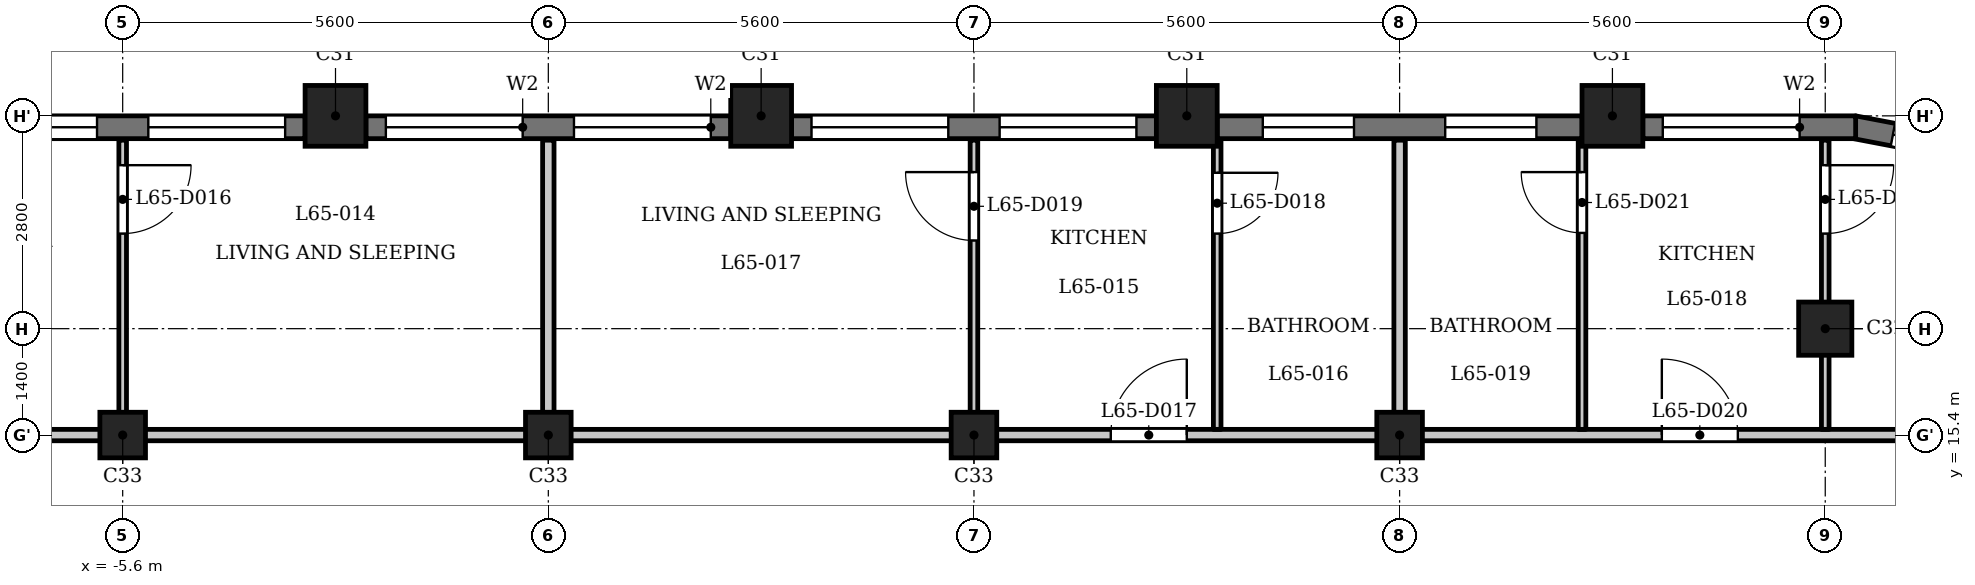
"""IFC4 building model, lengths in metres.
Left out: names, types, materials, properties, quantities, classifications, styles, units other than length and angle.
Written with IfcOpenShell. Run it as: python <this file> out.ifc"""

import sys

from ifc_helpers import new_model, si_unit, direction, frame, frame_2d, origin, origin_2d, place, context, subcontext, project, spatial, rectangle, extrude, element, fill, save


model = new_model("IFC4")
c1 = context("Model", 3, precision=1e-05, world=origin(), true_north=direction((0.0, 1.0)))
c2 = subcontext(c1, "Body", "Model", "MODEL_VIEW")
j1 = project(units=[si_unit("LENGTHUNIT", "METRE"), si_unit("PLANEANGLEUNIT", "RADIAN")], contexts=[c1])
p1 = place(None, origin())
s1 = spatial("IfcSite", under=j1, at=p1, CompositionType="ELEMENT")
p2 = place(p1, origin())
s2 = spatial("IfcBuilding", under=s1, at=p2, CompositionType="ELEMENT")
p3 = place(p2, frame((0.0, 0.0, 252.2)))
s3 = spatial("IfcBuildingStorey", under=s2, at=p3, CompositionType="ELEMENT", Elevation=252.2)
for number, where, z_axis, x_axis in (
    (1, (14.0, 19.6, 0.0), (0.0, 0.0, 1.0), (1.0, 0.0, 0.0)),
    (2, (8.4, 19.6, 0.0), (0.0, 0.0, 1.0), (1.0, 0.0, 0.0)),
    (3, (2.8, 19.6, 0.0), (0.0, 0.0, 1.0), (1.0, 0.0, 0.0)),
    (4, (-2.8, 19.6, 0.0), (0.0, 0.0, 1.0), (1.0, 0.0, 0.0)),
):
    element("IfcColumn", number, at=place(p3, frame(where, z_axis=z_axis, x_axis=x_axis)), inside=s3, PredefinedType="COLUMN", context=c2, shape_type="SweptSolid", body=[
        extrude(rectangle(XDim=0.8, YDim=0.8, at=origin_2d()), origin(), (0.0, 0.0, 1.0), 3.5),
    ])
p4 = place(p3, frame((16.8, 16.8, 0.0), z_axis=(0.0, 0.0, 1.0), x_axis=(1.0, 0.0, 0.0)))
e5 = element("IfcColumn", 5, at=p4, inside=s3, PredefinedType="COLUMN", context=c2, shape_type="SweptSolid", body=[
    extrude(rectangle(XDim=0.7, YDim=0.7, at=origin_2d()), origin(), (0.0, 0.0, 1.0), 3.5),
])
for number, where, z_axis, x_axis in (
    (6, (-5.6, 15.4, 0.0), (0.0, 0.0, 1.0), (1.0, 0.0, 0.0)),
    (7, (0.0, 15.4, 0.0), (0.0, 0.0, 1.0), (1.0, 0.0, 0.0)),
    (8, (5.6, 15.4, 0.0), (0.0, 0.0, 1.0), (1.0, 0.0, 0.0)),
    (9, (11.2, 15.4, 0.0), (0.0, 0.0, 1.0), (1.0, 0.0, 0.0)),
):
    element("IfcColumn", number, at=place(p3, frame(where, z_axis=z_axis, x_axis=x_axis)), inside=s3, PredefinedType="COLUMN", context=c2, shape_type="SweptSolid", body=[
        extrude(rectangle(XDim=0.6, YDim=0.6, at=origin_2d()), origin(), (0.0, 0.0, 1.0), 3.5),
    ])
p5 = place(p3, frame((18.995, 19.105, 0.0), z_axis=(0.0, 0.0, 1.0), x_axis=(-0.982301706131, 0.187305520826, 0.0)))
e10 = element("IfcWall", 10, at=p5, inside=s3, PredefinedType="SOLIDWALL", context=c2, shape_type="SweptSolid", body=[
    extrude(rectangle(XDim=1.856, YDim=0.3, at=frame_2d((0.928, 0.0))), origin(), (0.0, 0.0, 1.0), 2.55),
])
p6 = place(p5, frame((0.528, 0.0, 0.6)))
e11 = element("IfcOpeningElement", 11, at=p6, cuts=e10, PredefinedType="OPENING", context=c2, shape_type="SweptSolid", body=[
    extrude(rectangle(XDim=0.8, YDim=1.55, at=frame_2d((0.4, 0.775))), frame((0.0, 0.16, 0.0), z_axis=(0.0, -1.0, 0.0), x_axis=(1.0, 0.0, 0.0)), (0.0, 0.0, 1.0), 0.32),
])
p7 = place(p3, frame((17.2, 19.45, 0.0), z_axis=(0.0, 0.0, 1.0), x_axis=(-1.0, 0.0, 0.0)))
e12 = element("IfcWall", 12, at=p7, inside=s3, PredefinedType="SOLIDWALL", context=c2, shape_type="SweptSolid", body=[
    extrude(rectangle(XDim=2.8, YDim=0.3, at=frame_2d((1.4, 0.0))), origin(), (0.0, 0.0, 1.0), 2.55),
])
p8 = place(p7, frame((0.738, 0.0, 0.9)))
e13 = element("IfcOpeningElement", 13, at=p8, cuts=e12, PredefinedType="OPENING", context=c2, shape_type="SweptSolid", body=[
    extrude(rectangle(XDim=1.8, YDim=1.25, at=frame_2d((0.9, 0.625))), frame((0.0, 0.16, 0.0), z_axis=(0.0, -1.0, 0.0), x_axis=(1.0, 0.0, 0.0)), (0.0, 0.0, 1.0), 0.32),
])
p9 = place(p3, frame((13.6, 19.45, 0.0), z_axis=(0.0, 0.0, 1.0), x_axis=(-1.0, 0.0, 0.0)))
e14 = element("IfcWall", 14, at=p9, inside=s3, PredefinedType="SOLIDWALL", context=c2, shape_type="SweptSolid", body=[
    extrude(rectangle(XDim=4.8, YDim=0.3, at=frame_2d((2.4, 0.0))), origin(), (0.0, 0.0, 1.0), 2.55),
])
p10 = place(p9, frame((0.6, 0.0, 0.6)))
e15 = element("IfcOpeningElement", 15, at=p10, cuts=e14, PredefinedType="OPENING", context=c2, shape_type="SweptSolid", body=[
    extrude(rectangle(XDim=1.2, YDim=1.55, at=frame_2d((0.6, 0.775))), frame((0.0, 0.16, 0.0), z_axis=(0.0, -1.0, 0.0), x_axis=(1.0, 0.0, 0.0)), (0.0, 0.0, 1.0), 0.32),
])
p11 = place(p9, frame((3.0, 0.0, 0.6)))
e16 = element("IfcOpeningElement", 16, at=p11, cuts=e14, PredefinedType="OPENING", context=c2, shape_type="SweptSolid", body=[
    extrude(rectangle(XDim=1.2, YDim=1.55, at=frame_2d((0.6, 0.775))), frame((0.0, 0.16, 0.0), z_axis=(0.0, -1.0, 0.0), x_axis=(1.0, 0.0, 0.0)), (0.0, 0.0, 1.0), 0.32),
])
p12 = place(p3, frame((8.0, 19.45, 0.0), z_axis=(0.0, 0.0, 1.0), x_axis=(-1.0, 0.0, 0.0)))
e17 = element("IfcWall", 17, at=p12, inside=s3, PredefinedType="SOLIDWALL", context=c2, shape_type="SweptSolid", body=[
    extrude(rectangle(XDim=4.8, YDim=0.3, at=frame_2d((2.4, 0.0))), origin(), (0.0, 0.0, 1.0), 2.55),
])
p13 = place(p12, frame((0.262, 0.0, 0.9)))
e18 = element("IfcOpeningElement", 18, at=p13, cuts=e17, PredefinedType="OPENING", context=c2, shape_type="SweptSolid", body=[
    extrude(rectangle(XDim=1.8, YDim=1.25, at=frame_2d((0.9, 0.625))), frame((0.0, 0.16, 0.0), z_axis=(0.0, -1.0, 0.0), x_axis=(1.0, 0.0, 0.0)), (0.0, 0.0, 1.0), 0.32),
])
p14 = place(p12, frame((2.738, 0.0, 0.9)))
e19 = element("IfcOpeningElement", 19, at=p14, cuts=e17, PredefinedType="OPENING", context=c2, shape_type="SweptSolid", body=[
    extrude(rectangle(XDim=1.8, YDim=1.25, at=frame_2d((0.9, 0.625))), frame((0.0, 0.16, 0.0), z_axis=(0.0, -1.0, 0.0), x_axis=(1.0, 0.0, 0.0)), (0.0, 0.0, 1.0), 0.32),
])
p15 = place(p3, frame((2.4, 19.45, 0.0), z_axis=(0.0, 0.0, 1.0), x_axis=(-1.0, 0.0, 0.0)))
e20 = element("IfcWall", 20, at=p15, inside=s3, PredefinedType="SOLIDWALL", context=c2, shape_type="SweptSolid", body=[
    extrude(rectangle(XDim=4.8, YDim=0.3, at=frame_2d((2.4, 0.0))), origin(), (0.0, 0.0, 1.0), 2.55),
])
p16 = place(p15, frame((0.262, 0.0, 0.9)))
e21 = element("IfcOpeningElement", 21, at=p16, cuts=e20, PredefinedType="OPENING", context=c2, shape_type="SweptSolid", body=[
    extrude(rectangle(XDim=1.8, YDim=1.25, at=frame_2d((0.9, 0.625))), frame((0.0, 0.16, 0.0), z_axis=(0.0, -1.0, 0.0), x_axis=(1.0, 0.0, 0.0)), (0.0, 0.0, 1.0), 0.32),
])
p17 = place(p15, frame((2.738, 0.0, 0.9)))
e22 = element("IfcOpeningElement", 22, at=p17, cuts=e20, PredefinedType="OPENING", context=c2, shape_type="SweptSolid", body=[
    extrude(rectangle(XDim=1.8, YDim=1.25, at=frame_2d((0.9, 0.625))), frame((0.0, 0.16, 0.0), z_axis=(0.0, -1.0, 0.0), x_axis=(1.0, 0.0, 0.0)), (0.0, 0.0, 1.0), 0.32),
])
p18 = place(p3, frame((-3.2, 19.45, 0.0), z_axis=(0.0, 0.0, 1.0), x_axis=(-1.0, 0.0, 0.0)))
e23 = element("IfcWall", 23, at=p18, inside=s3, PredefinedType="SOLIDWALL", context=c2, shape_type="SweptSolid", body=[
    extrude(rectangle(XDim=4.8, YDim=0.3, at=frame_2d((2.4, 0.0))), origin(), (0.0, 0.0, 1.0), 2.55),
])
p19 = place(p18, frame((0.262, 0.0, 0.9)))
e24 = element("IfcOpeningElement", 24, at=p19, cuts=e23, PredefinedType="OPENING", context=c2, shape_type="SweptSolid", body=[
    extrude(rectangle(XDim=1.8, YDim=1.25, at=frame_2d((0.9, 0.625))), frame((0.0, 0.16, 0.0), z_axis=(0.0, -1.0, 0.0), x_axis=(1.0, 0.0, 0.0)), (0.0, 0.0, 1.0), 0.32),
])
p20 = place(p18, frame((2.738, 0.0, 0.9)))
e25 = element("IfcOpeningElement", 25, at=p20, cuts=e23, PredefinedType="OPENING", context=c2, shape_type="SweptSolid", body=[
    extrude(rectangle(XDim=1.8, YDim=1.25, at=frame_2d((0.9, 0.625))), frame((0.0, 0.16, 0.0), z_axis=(0.0, -1.0, 0.0), x_axis=(1.0, 0.0, 0.0)), (0.0, 0.0, 1.0), 0.32),
])
p21 = place(p3, frame((-23.55, 15.4, 0.0), z_axis=(0.0, 0.0, 1.0), x_axis=(1.0, 0.0, 0.0)))
e26 = element("IfcWall", 26, at=p21, inside=s3, PredefinedType="PARTITIONING", context=c2, shape_type="SweptSolid", body=[
    extrude(rectangle(XDim=46.872, YDim=0.15, at=frame_2d((23.436, 0.0))), origin(), (0.0, 0.0, 1.0), 3.2),
])
p22 = place(p21, frame((8.05, 0.0, 0.0)))
e27 = element("IfcOpeningElement", 27, at=p22, cuts=e26, PredefinedType="OPENING", context=c2, shape_type="SweptSolid", body=[
    extrude(rectangle(XDim=1.0, YDim=2.1, at=frame_2d((0.5, 1.05))), frame((0.0, 0.085, 0.0), z_axis=(0.0, -1.0, 0.0), x_axis=(1.0, 0.0, 0.0)), (0.0, 0.0, 1.0), 0.17),
])
p23 = place(p21, frame((15.05, 0.0, 0.0)))
e28 = element("IfcOpeningElement", 28, at=p23, cuts=e26, PredefinedType="OPENING", context=c2, shape_type="SweptSolid", body=[
    extrude(rectangle(XDim=1.0, YDim=2.1, at=frame_2d((0.5, 1.05))), frame((0.0, 0.085, 0.0), z_axis=(0.0, -1.0, 0.0), x_axis=(1.0, 0.0, 0.0)), (0.0, 0.0, 1.0), 0.17),
])
p24 = place(p21, frame((30.95, 0.0, 0.0)))
e29 = element("IfcOpeningElement", 29, at=p24, cuts=e26, PredefinedType="OPENING", context=c2, shape_type="SweptSolid", body=[
    extrude(rectangle(XDim=1.0, YDim=2.1, at=frame_2d((0.5, 1.05))), frame((0.0, 0.085, 0.0), z_axis=(0.0, -1.0, 0.0), x_axis=(1.0, 0.0, 0.0)), (0.0, 0.0, 1.0), 0.17),
])
p25 = place(p21, frame((38.2, 0.0, 0.0)))
e30 = element("IfcOpeningElement", 30, at=p25, cuts=e26, PredefinedType="OPENING", context=c2, shape_type="SweptSolid", body=[
    extrude(rectangle(XDim=1.0, YDim=2.1, at=frame_2d((0.5, 1.05))), frame((0.0, 0.085, 0.0), z_axis=(0.0, -1.0, 0.0), x_axis=(1.0, 0.0, 0.0)), (0.0, 0.0, 1.0), 0.17),
])
p26 = place(p3, frame((-5.6, 15.475, 0.0), z_axis=(0.0, 0.0, 1.0), x_axis=(0.0, 1.0, 0.0)))
e31 = element("IfcWall", 31, at=p26, inside=s3, PredefinedType="PARTITIONING", context=c2, shape_type="SweptSolid", body=[
    extrude(rectangle(XDim=3.805, YDim=0.1, at=frame_2d((1.902, 0.0))), origin(), (0.0, 0.0, 1.0), 3.2),
])
p27 = place(p26, frame((2.576, 0.0, 0.0)))
e32 = element("IfcOpeningElement", 32, at=p27, cuts=e31, PredefinedType="OPENING", context=c2, shape_type="SweptSolid", body=[
    extrude(rectangle(XDim=0.9, YDim=2.1, at=frame_2d((0.45, 1.05))), frame((0.0, 0.06, 0.0), z_axis=(0.0, -1.0, 0.0), x_axis=(1.0, 0.0, 0.0)), (0.0, 0.0, 1.0), 0.12),
])
p28 = place(p3, frame((0.0, 15.475, 0.0), z_axis=(0.0, 0.0, 1.0), x_axis=(0.0, 1.0, 0.0)))
e33 = element("IfcWall", 33, at=p28, inside=s3, PredefinedType="PARTITIONING", context=c2, shape_type="SweptSolid", body=[
    extrude(rectangle(XDim=3.805, YDim=0.15, at=frame_2d((1.902, 0.0))), origin(), (0.0, 0.0, 1.0), 3.2),
])
p29 = place(p3, frame((5.6, 15.475, 0.0), z_axis=(0.0, 0.0, 1.0), x_axis=(0.0, 1.0, 0.0)))
e34 = element("IfcWall", 34, at=p29, inside=s3, PredefinedType="PARTITIONING", context=c2, shape_type="SweptSolid", body=[
    extrude(rectangle(XDim=3.805, YDim=0.1, at=frame_2d((1.902, 0.0))), origin(), (0.0, 0.0, 1.0), 3.2),
])
p30 = place(p29, frame((2.485, 0.0, 0.0)))
e35 = element("IfcOpeningElement", 35, at=p30, cuts=e34, PredefinedType="OPENING", context=c2, shape_type="SweptSolid", body=[
    extrude(rectangle(XDim=0.9, YDim=2.1, at=frame_2d((0.45, 1.05))), frame((0.0, 0.06, 0.0), z_axis=(0.0, -1.0, 0.0), x_axis=(1.0, 0.0, 0.0)), (0.0, 0.0, 1.0), 0.12),
])
p31 = place(p3, frame((8.8, 15.475, 0.0), z_axis=(0.0, 0.0, 1.0), x_axis=(0.0, 1.0, 0.0)))
e36 = element("IfcWall", 36, at=p31, inside=s3, PredefinedType="PARTITIONING", context=c2, shape_type="SweptSolid", body=[
    extrude(rectangle(XDim=3.805, YDim=0.1, at=frame_2d((1.902, 0.0))), origin(), (0.0, 0.0, 1.0), 3.2),
])
p32 = place(p31, frame((2.576, 0.0, 0.0)))
e37 = element("IfcOpeningElement", 37, at=p32, cuts=e36, PredefinedType="OPENING", context=c2, shape_type="SweptSolid", body=[
    extrude(rectangle(XDim=0.8, YDim=2.1, at=frame_2d((0.4, 1.05))), frame((0.0, 0.06, 0.0), z_axis=(0.0, -1.0, 0.0), x_axis=(1.0, 0.0, 0.0)), (0.0, 0.0, 1.0), 0.12),
])
p33 = place(p3, frame((11.2, 15.475, 0.0), z_axis=(0.0, 0.0, 1.0), x_axis=(0.0, 1.0, 0.0)))
e38 = element("IfcWall", 38, at=p33, inside=s3, PredefinedType="PARTITIONING", context=c2, shape_type="SweptSolid", body=[
    extrude(rectangle(XDim=3.805, YDim=0.15, at=frame_2d((1.902, 0.0))), origin(), (0.0, 0.0, 1.0), 3.2),
])
p34 = place(p3, frame((13.6, 15.475, 0.0), z_axis=(0.0, 0.0, 1.0), x_axis=(0.0, 1.0, 0.0)))
e39 = element("IfcWall", 39, at=p34, inside=s3, PredefinedType="PARTITIONING", context=c2, shape_type="SweptSolid", body=[
    extrude(rectangle(XDim=3.805, YDim=0.1, at=frame_2d((1.902, 0.0))), origin(), (0.0, 0.0, 1.0), 3.2),
])
p35 = place(p34, frame((2.585, 0.0, 0.0)))
e40 = element("IfcOpeningElement", 40, at=p35, cuts=e39, PredefinedType="OPENING", context=c2, shape_type="SweptSolid", body=[
    extrude(rectangle(XDim=0.8, YDim=2.1, at=frame_2d((0.4, 1.05))), frame((0.0, 0.06, 0.0), z_axis=(0.0, -1.0, 0.0), x_axis=(1.0, 0.0, 0.0)), (0.0, 0.0, 1.0), 0.12),
])
p36 = place(p3, frame((16.8, 15.475, 0.0), z_axis=(0.0, 0.0, 1.0), x_axis=(0.0, 1.0, 0.0)))
e41 = element("IfcWall", 41, at=p36, inside=s3, PredefinedType="PARTITIONING", context=c2, shape_type="SweptSolid", body=[
    extrude(rectangle(XDim=3.805, YDim=0.1, at=frame_2d((1.902, 0.0))), origin(), (0.0, 0.0, 1.0), 3.2),
])
p37 = place(p36, frame((2.576, 0.0, 0.0)))
e42 = element("IfcOpeningElement", 42, at=p37, cuts=e41, PredefinedType="OPENING", context=c2, shape_type="SweptSolid", body=[
    extrude(rectangle(XDim=0.9, YDim=2.1, at=frame_2d((0.45, 1.05))), frame((0.0, 0.06, 0.0), z_axis=(0.0, -1.0, 0.0), x_axis=(1.0, 0.0, 0.0)), (0.0, 0.0, 1.0), 0.12),
])
p38 = place(p27, origin())
e43 = element("IfcDoor", 43, at=p38, inside=s3, OperationType="SINGLE_SWING_RIGHT", PredefinedType="DOOR", context=c2, shape_type="SweptSolid", body=[
    extrude(rectangle(XDim=0.9, YDim=2.1, at=frame_2d((0.45, 1.05))), frame((0.0, 0.025, 0.0), z_axis=(0.0, -1.0, 0.0), x_axis=(1.0, 0.0, 0.0)), (0.0, 0.0, 1.0), 0.05),
])
fill(e32, e43)
p39 = place(p24, origin())
e44 = element("IfcDoor", 44, at=p39, inside=s3, OperationType="SINGLE_SWING_LEFT", PredefinedType="DOOR", context=c2, shape_type="SweptSolid", body=[
    extrude(rectangle(XDim=1.0, YDim=2.1, at=frame_2d((0.5, 1.05))), frame((0.0, 0.025, 0.0), z_axis=(0.0, -1.0, 0.0), x_axis=(1.0, 0.0, 0.0)), (0.0, 0.0, 1.0), 0.05),
])
fill(e29, e44)
p40 = place(p32, origin())
e45 = element("IfcDoor", 45, at=p40, inside=s3, OperationType="SINGLE_SWING_RIGHT", PredefinedType="DOOR", context=c2, shape_type="SweptSolid", body=[
    extrude(rectangle(XDim=0.8, YDim=2.1, at=frame_2d((0.4, 1.05))), frame((0.0, 0.025, 0.0), z_axis=(0.0, -1.0, 0.0), x_axis=(1.0, 0.0, 0.0)), (0.0, 0.0, 1.0), 0.05),
])
fill(e37, e45)
p41 = place(p30, origin())
e46 = element("IfcDoor", 46, at=p41, inside=s3, OperationType="SINGLE_SWING_LEFT", PredefinedType="DOOR", context=c2, shape_type="SweptSolid", body=[
    extrude(rectangle(XDim=0.9, YDim=2.1, at=frame_2d((0.45, 1.05))), frame((0.0, 0.025, 0.0), z_axis=(0.0, -1.0, 0.0), x_axis=(1.0, 0.0, 0.0)), (0.0, 0.0, 1.0), 0.05),
])
fill(e35, e46)
p42 = place(p25, origin())
e47 = element("IfcDoor", 47, at=p42, inside=s3, OperationType="SINGLE_SWING_RIGHT", PredefinedType="DOOR", context=c2, shape_type="SweptSolid", body=[
    extrude(rectangle(XDim=1.0, YDim=2.1, at=frame_2d((0.5, 1.05))), frame((0.0, 0.025, 0.0), z_axis=(0.0, -1.0, 0.0), x_axis=(1.0, 0.0, 0.0)), (0.0, 0.0, 1.0), 0.05),
])
fill(e30, e47)
p43 = place(p35, origin())
e48 = element("IfcDoor", 48, at=p43, inside=s3, OperationType="SINGLE_SWING_LEFT", PredefinedType="DOOR", context=c2, shape_type="SweptSolid", body=[
    extrude(rectangle(XDim=0.8, YDim=2.1, at=frame_2d((0.4, 1.05))), frame((0.0, 0.025, 0.0), z_axis=(0.0, -1.0, 0.0), x_axis=(1.0, 0.0, 0.0)), (0.0, 0.0, 1.0), 0.05),
])
fill(e40, e48)
p44 = place(p37, origin())
e49 = element("IfcDoor", 49, at=p44, inside=s3, OperationType="SINGLE_SWING_RIGHT", PredefinedType="DOOR", context=c2, shape_type="SweptSolid", body=[
    extrude(rectangle(XDim=0.9, YDim=2.1, at=frame_2d((0.45, 1.05))), frame((0.0, 0.025, 0.0), z_axis=(0.0, -1.0, 0.0), x_axis=(1.0, 0.0, 0.0)), (0.0, 0.0, 1.0), 0.05),
])
fill(e42, e49)
p45 = place(p6, origin())
e50 = element("IfcWindow", 50, at=p45, inside=s3, PartitioningType="SINGLE_PANEL", PredefinedType="WINDOW", context=c2, shape_type="SweptSolid", body=[
    extrude(rectangle(XDim=0.8, YDim=1.55, at=frame_2d((0.4, 0.775))), frame((0.0, 0.03, 0.0), z_axis=(0.0, -1.0, 0.0), x_axis=(1.0, 0.0, 0.0)), (0.0, 0.0, 1.0), 0.06),
])
fill(e11, e50)
p46 = place(p8, origin())
e51 = element("IfcWindow", 51, at=p46, inside=s3, PartitioningType="SINGLE_PANEL", PredefinedType="WINDOW", context=c2, shape_type="SweptSolid", body=[
    extrude(rectangle(XDim=1.8, YDim=1.25, at=frame_2d((0.9, 0.625))), frame((0.0, 0.03, 0.0), z_axis=(0.0, -1.0, 0.0), x_axis=(1.0, 0.0, 0.0)), (0.0, 0.0, 1.0), 0.06),
])
fill(e13, e51)
p47 = place(p10, origin())
e52 = element("IfcWindow", 52, at=p47, inside=s3, PartitioningType="SINGLE_PANEL", PredefinedType="WINDOW", context=c2, shape_type="SweptSolid", body=[
    extrude(rectangle(XDim=1.2, YDim=1.55, at=frame_2d((0.6, 0.775))), frame((0.0, 0.03, 0.0), z_axis=(0.0, -1.0, 0.0), x_axis=(1.0, 0.0, 0.0)), (0.0, 0.0, 1.0), 0.06),
])
fill(e15, e52)
p48 = place(p11, origin())
e53 = element("IfcWindow", 53, at=p48, inside=s3, PartitioningType="SINGLE_PANEL", PredefinedType="WINDOW", context=c2, shape_type="SweptSolid", body=[
    extrude(rectangle(XDim=1.2, YDim=1.55, at=frame_2d((0.6, 0.775))), frame((0.0, 0.03, 0.0), z_axis=(0.0, -1.0, 0.0), x_axis=(1.0, 0.0, 0.0)), (0.0, 0.0, 1.0), 0.06),
])
fill(e16, e53)
p49 = place(p13, origin())
e54 = element("IfcWindow", 54, at=p49, inside=s3, PartitioningType="SINGLE_PANEL", PredefinedType="WINDOW", context=c2, shape_type="SweptSolid", body=[
    extrude(rectangle(XDim=1.8, YDim=1.25, at=frame_2d((0.9, 0.625))), frame((0.0, 0.03, 0.0), z_axis=(0.0, -1.0, 0.0), x_axis=(1.0, 0.0, 0.0)), (0.0, 0.0, 1.0), 0.06),
])
fill(e18, e54)
p50 = place(p14, origin())
e55 = element("IfcWindow", 55, at=p50, inside=s3, PartitioningType="SINGLE_PANEL", PredefinedType="WINDOW", context=c2, shape_type="SweptSolid", body=[
    extrude(rectangle(XDim=1.8, YDim=1.25, at=frame_2d((0.9, 0.625))), frame((0.0, 0.03, 0.0), z_axis=(0.0, -1.0, 0.0), x_axis=(1.0, 0.0, 0.0)), (0.0, 0.0, 1.0), 0.06),
])
fill(e19, e55)
p51 = place(p16, origin())
e56 = element("IfcWindow", 56, at=p51, inside=s3, PartitioningType="SINGLE_PANEL", PredefinedType="WINDOW", context=c2, shape_type="SweptSolid", body=[
    extrude(rectangle(XDim=1.8, YDim=1.25, at=frame_2d((0.9, 0.625))), frame((0.0, 0.03, 0.0), z_axis=(0.0, -1.0, 0.0), x_axis=(1.0, 0.0, 0.0)), (0.0, 0.0, 1.0), 0.06),
])
fill(e21, e56)
p52 = place(p17, origin())
e57 = element("IfcWindow", 57, at=p52, inside=s3, PartitioningType="SINGLE_PANEL", PredefinedType="WINDOW", context=c2, shape_type="SweptSolid", body=[
    extrude(rectangle(XDim=1.8, YDim=1.25, at=frame_2d((0.9, 0.625))), frame((0.0, 0.03, 0.0), z_axis=(0.0, -1.0, 0.0), x_axis=(1.0, 0.0, 0.0)), (0.0, 0.0, 1.0), 0.06),
])
fill(e22, e57)
p53 = place(p19, origin())
e58 = element("IfcWindow", 58, at=p53, inside=s3, PartitioningType="SINGLE_PANEL", PredefinedType="WINDOW", context=c2, shape_type="SweptSolid", body=[
    extrude(rectangle(XDim=1.8, YDim=1.25, at=frame_2d((0.9, 0.625))), frame((0.0, 0.03, 0.0), z_axis=(0.0, -1.0, 0.0), x_axis=(1.0, 0.0, 0.0)), (0.0, 0.0, 1.0), 0.06),
])
fill(e24, e58)
p54 = place(p20, origin())
e59 = element("IfcWindow", 59, at=p54, inside=s3, PartitioningType="SINGLE_PANEL", PredefinedType="WINDOW", context=c2, shape_type="SweptSolid", body=[
    extrude(rectangle(XDim=1.8, YDim=1.25, at=frame_2d((0.9, 0.625))), frame((0.0, 0.03, 0.0), z_axis=(0.0, -1.0, 0.0), x_axis=(1.0, 0.0, 0.0)), (0.0, 0.0, 1.0), 0.06),
])
fill(e25, e59)
save(model, sys.argv[1])
